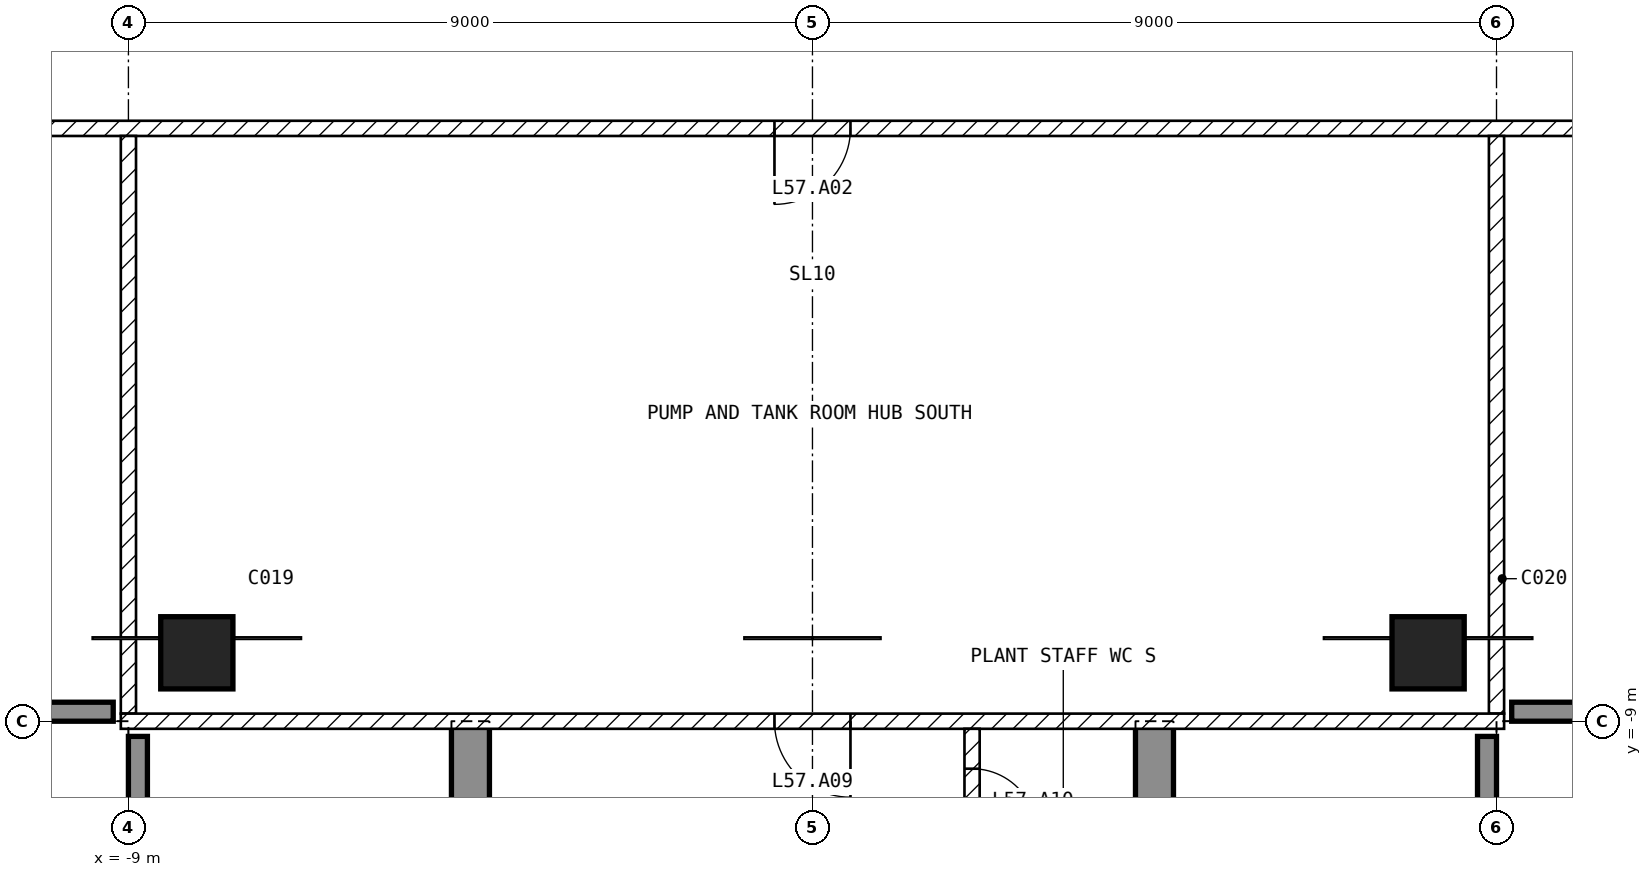
"""IFC4 building model, lengths in metres.
Left out: names, types, materials, properties, quantities, classifications, styles, units other than length and angle.
Written with IfcOpenShell. Run it as: python <this file> out.ifc"""

import sys

from ifc_helpers import new_model, si_unit, direction, frame, frame_2d, origin, origin_2d, place, context, subcontext, project, spatial, polyline, rectangle, outline, extrude, element, fill, save


model = new_model("IFC4")
c1 = context("Model", 3, precision=1e-05, world=origin(), true_north=direction((0.0, 1.0)))
c2 = subcontext(c1, "Body", "Model", "MODEL_VIEW")
j1 = project(units=[si_unit("LENGTHUNIT", "METRE"), si_unit("PLANEANGLEUNIT", "RADIAN")], contexts=[c1])
p1 = place(None, origin())
s1 = spatial("IfcSite", under=j1, at=p1, CompositionType="ELEMENT")
p2 = place(p1, origin())
s2 = spatial("IfcBuilding", under=s1, at=p2, CompositionType="ELEMENT")
p3 = place(p2, frame((0.0, 0.0, 228.0)))
s3 = spatial("IfcBuildingStorey", under=s2, at=p3, CompositionType="ELEMENT", Elevation=228.0)
for number, where, z_axis, x_axis in (
    (1, (-8.1, -8.1, -0.45), (0.0, 0.0, 1.0), (1.0, 0.0, 0.0)),
    (2, (8.1, -8.1, -0.45), (0.0, 0.0, 1.0), (1.0, 0.0, 0.0)),
):
    element("IfcColumn", number, at=place(p3, frame(where, z_axis=z_axis, x_axis=x_axis)), inside=s3, PredefinedType="COLUMN", context=c2, shape_type="SweptSolid", body=[
        extrude(rectangle(XDim=0.95, YDim=0.95, at=origin_2d()), origin(), (0.0, 0.0, 1.0), 4.7),
    ])
for number, where, z_axis, x_axis in (
    (3, (-4.75, -19.8, -0.45), (1.0, 0.0, 0.0), (0.0, 1.0, 0.0)),
    (4, (4.25, -19.8, -0.45), (1.0, 0.0, 0.0), (0.0, 1.0, 0.0)),
):
    element("IfcWall", number, at=place(p3, frame(where, z_axis=z_axis, x_axis=x_axis)), inside=s3, PredefinedType="SHEAR", context=c2, shape_type="SweptSolid", body=[
        extrude(outline(polyline([(0.0, 0.0), (6.3, 0.0), (6.3, 2.85), (8.7, 2.85), (8.7, 0.0), (10.8, 0.0), (10.8, 4.7), (0.0, 4.7), (0.0, 0.0)])), origin(), (0.0, 0.0, 1.0), 0.5),
    ])
p4 = place(p3, frame((-17.8, -8.875, 0.0), z_axis=(0.0, 0.0, 1.0), x_axis=(1.0, 0.0, 0.0)))
e5 = element("IfcWall", 5, at=p4, inside=s3, PredefinedType="SOLIDWALL", context=c2, shape_type="SweptSolid", body=[
    extrude(rectangle(XDim=8.6, YDim=0.25, at=frame_2d((4.3, 0.0))), origin(), (0.0, 0.0, 1.0), 4.25),
])
p5 = place(p3, frame((-8.875, -9.2, 0.0), z_axis=(0.0, 0.0, 1.0), x_axis=(0.0, -1.0, 0.0)))
e6 = element("IfcWall", 6, at=p5, inside=s3, PredefinedType="SOLIDWALL", context=c2, shape_type="SweptSolid", body=[
    extrude(rectangle(XDim=8.6, YDim=0.25, at=frame_2d((4.3, 0.0))), origin(), (0.0, 0.0, 1.0), 4.25),
])
p6 = place(p5, frame((2.8, 0.0, 1.0)))
e7 = element("IfcOpeningElement", 7, at=p6, cuts=e6, PredefinedType="OPENING", context=c2, shape_type="SweptSolid", body=[
    extrude(rectangle(XDim=3.0, YDim=2.4, at=frame_2d((1.5, 1.2))), frame((0.0, 0.135, 0.0), z_axis=(0.0, -1.0, 0.0), x_axis=(1.0, 0.0, 0.0)), (0.0, 0.0, 1.0), 0.27),
])
p7 = place(p3, frame((8.875, -17.8, 0.0), z_axis=(0.0, 0.0, 1.0), x_axis=(0.0, 1.0, 0.0)))
e8 = element("IfcWall", 8, at=p7, inside=s3, PredefinedType="SOLIDWALL", context=c2, shape_type="SweptSolid", body=[
    extrude(rectangle(XDim=8.6, YDim=0.25, at=frame_2d((4.3, 0.0))), origin(), (0.0, 0.0, 1.0), 4.25),
])
p8 = place(p7, frame((2.8, 0.0, 1.0)))
e9 = element("IfcOpeningElement", 9, at=p8, cuts=e8, PredefinedType="OPENING", context=c2, shape_type="SweptSolid", body=[
    extrude(rectangle(XDim=3.0, YDim=2.4, at=frame_2d((1.5, 1.2))), frame((0.0, 0.135, 0.0), z_axis=(0.0, -1.0, 0.0), x_axis=(1.0, 0.0, 0.0)), (0.0, 0.0, 1.0), 0.27),
])
p9 = place(p3, frame((9.2, -8.875, 0.0), z_axis=(0.0, 0.0, 1.0), x_axis=(1.0, 0.0, 0.0)))
e10 = element("IfcWall", 10, at=p9, inside=s3, PredefinedType="SOLIDWALL", context=c2, shape_type="SweptSolid", body=[
    extrude(rectangle(XDim=8.6, YDim=0.25, at=frame_2d((4.3, 0.0))), origin(), (0.0, 0.0, 1.0), 4.25),
])
p10 = place(p3, frame((21.6, -1.2, 0.0), z_axis=(0.0, 0.0, 1.0), x_axis=(-1.0, 0.0, 0.0)))
e11 = element("IfcWall", 11, at=p10, inside=s3, PredefinedType="PARTITIONING", context=c2, shape_type="SweptSolid", body=[
    extrude(rectangle(XDim=43.2, YDim=0.2, at=frame_2d((21.6, 0.0))), origin(), (0.0, 0.0, 1.0), 4.25),
])
p11 = place(p10, frame((21.1, 0.0, 0.0)))
e12 = element("IfcOpeningElement", 12, at=p11, cuts=e11, PredefinedType="OPENING", context=c2, shape_type="SweptSolid", body=[
    extrude(rectangle(XDim=1.0, YDim=2.1, at=frame_2d((0.5, 1.05))), frame((0.0, 0.11, 0.0), z_axis=(0.0, -1.0, 0.0), x_axis=(1.0, 0.0, 0.0)), (0.0, 0.0, 1.0), 0.22),
])
p12 = place(p10, frame((9.4, 0.0, 0.0)))
e13 = element("IfcOpeningElement", 13, at=p12, cuts=e11, PredefinedType="OPENING", context=c2, shape_type="SweptSolid", body=[
    extrude(rectangle(XDim=1.0, YDim=2.1, at=frame_2d((0.5, 1.05))), frame((0.0, 0.11, 0.0), z_axis=(0.0, -1.0, 0.0), x_axis=(1.0, 0.0, 0.0)), (0.0, 0.0, 1.0), 0.22),
])
p13 = place(p10, frame((3.1, 0.0, 0.0)))
e14 = element("IfcOpeningElement", 14, at=p13, cuts=e11, PredefinedType="OPENING", context=c2, shape_type="SweptSolid", body=[
    extrude(rectangle(XDim=1.0, YDim=2.1, at=frame_2d((0.5, 1.05))), frame((0.0, 0.11, 0.0), z_axis=(0.0, -1.0, 0.0), x_axis=(1.0, 0.0, 0.0)), (0.0, 0.0, 1.0), 0.22),
])
p14 = place(p10, frame((32.8, 0.0, 0.0)))
e15 = element("IfcOpeningElement", 15, at=p14, cuts=e11, PredefinedType="OPENING", context=c2, shape_type="SweptSolid", body=[
    extrude(rectangle(XDim=1.0, YDim=2.1, at=frame_2d((0.5, 1.05))), frame((0.0, 0.11, 0.0), z_axis=(0.0, -1.0, 0.0), x_axis=(1.0, 0.0, 0.0)), (0.0, 0.0, 1.0), 0.22),
])
p15 = place(p10, frame((39.1, 0.0, 0.0)))
e16 = element("IfcOpeningElement", 16, at=p15, cuts=e11, PredefinedType="OPENING", context=c2, shape_type="SweptSolid", body=[
    extrude(rectangle(XDim=1.0, YDim=2.1, at=frame_2d((0.5, 1.05))), frame((0.0, 0.11, 0.0), z_axis=(0.0, -1.0, 0.0), x_axis=(1.0, 0.0, 0.0)), (0.0, 0.0, 1.0), 0.22),
])
for number, where, z_axis, x_axis in (
    (17, (9.0, -1.3, 0.0), (0.0, 0.0, 1.0), (0.0, -1.0, 0.0)),
    (18, (-9.0, -8.9, 0.0), (0.0, 0.0, 1.0), (0.0, 1.0, 0.0)),
):
    element("IfcWall", number, at=place(p3, frame(where, z_axis=z_axis, x_axis=x_axis)), inside=s3, PredefinedType="PARTITIONING", context=c2, shape_type="SweptSolid", body=[
        extrude(rectangle(XDim=7.6, YDim=0.2, at=frame_2d((3.8, 0.0))), origin(), (0.0, 0.0, 1.0), 4.25),
    ])
p16 = place(p3, frame((9.1, -9.0, 0.0), z_axis=(0.0, 0.0, 1.0), x_axis=(-1.0, 0.0, 0.0)))
e19 = element("IfcWall", 19, at=p16, inside=s3, PredefinedType="PARTITIONING", context=c2, shape_type="SweptSolid", body=[
    extrude(rectangle(XDim=18.2, YDim=0.2, at=frame_2d((9.1, 0.0))), origin(), (0.0, 0.0, 1.0), 4.25),
])
p17 = place(p16, frame((8.6, 0.0, 0.0)))
e20 = element("IfcOpeningElement", 20, at=p17, cuts=e19, PredefinedType="OPENING", context=c2, shape_type="SweptSolid", body=[
    extrude(rectangle(XDim=1.0, YDim=2.1, at=frame_2d((0.5, 1.05))), frame((0.0, 0.11, 0.0), z_axis=(0.0, -1.0, 0.0), x_axis=(1.0, 0.0, 0.0)), (0.0, 0.0, 1.0), 0.22),
])
p18 = place(p3, frame((2.1, -9.1, 0.0), z_axis=(0.0, 0.0, 1.0), x_axis=(0.0, -1.0, 0.0)))
e21 = element("IfcWall", 21, at=p18, inside=s3, PredefinedType="PARTITIONING", context=c2, shape_type="SweptSolid", body=[
    extrude(rectangle(XDim=1.9, YDim=0.2, at=frame_2d((0.95, 0.0))), origin(), (0.0, 0.0, 1.0), 4.25),
])
p19 = place(p18, frame((0.525, 0.0, 0.0)))
e22 = element("IfcOpeningElement", 22, at=p19, cuts=e21, PredefinedType="OPENING", context=c2, shape_type="SweptSolid", body=[
    extrude(rectangle(XDim=0.85, YDim=2.1, at=frame_2d((0.425, 1.05))), frame((0.0, 0.11, 0.0), z_axis=(0.0, -1.0, 0.0), x_axis=(1.0, 0.0, 0.0)), (0.0, 0.0, 1.0), 0.22),
])
p20 = place(p11, origin())
e23 = element("IfcDoor", 23, at=p20, inside=s3, OperationType="SINGLE_SWING_RIGHT", PredefinedType="DOOR", context=c2, shape_type="SweptSolid", body=[
    extrude(rectangle(XDim=1.0, YDim=2.1, at=frame_2d((0.5, 1.05))), frame((0.0, 0.025, 0.0), z_axis=(0.0, -1.0, 0.0), x_axis=(1.0, 0.0, 0.0)), (0.0, 0.0, 1.0), 0.05),
])
fill(e12, e23)
p21 = place(p17, origin())
e24 = element("IfcDoor", 24, at=p21, inside=s3, OperationType="SINGLE_SWING_LEFT", PredefinedType="DOOR", context=c2, shape_type="SweptSolid", body=[
    extrude(rectangle(XDim=1.0, YDim=2.1, at=frame_2d((0.5, 1.05))), frame((0.0, 0.025, 0.0), z_axis=(0.0, -1.0, 0.0), x_axis=(1.0, 0.0, 0.0)), (0.0, 0.0, 1.0), 0.05),
])
fill(e20, e24)
p22 = place(p19, origin())
e25 = element("IfcDoor", 25, at=p22, inside=s3, OperationType="SINGLE_SWING_RIGHT", PredefinedType="DOOR", context=c2, shape_type="SweptSolid", body=[
    extrude(rectangle(XDim=0.85, YDim=2.1, at=frame_2d((0.425, 1.05))), frame((0.0, 0.025, 0.0), z_axis=(0.0, -1.0, 0.0), x_axis=(1.0, 0.0, 0.0)), (0.0, 0.0, 1.0), 0.05),
])
fill(e22, e25)
save(model, sys.argv[1])
